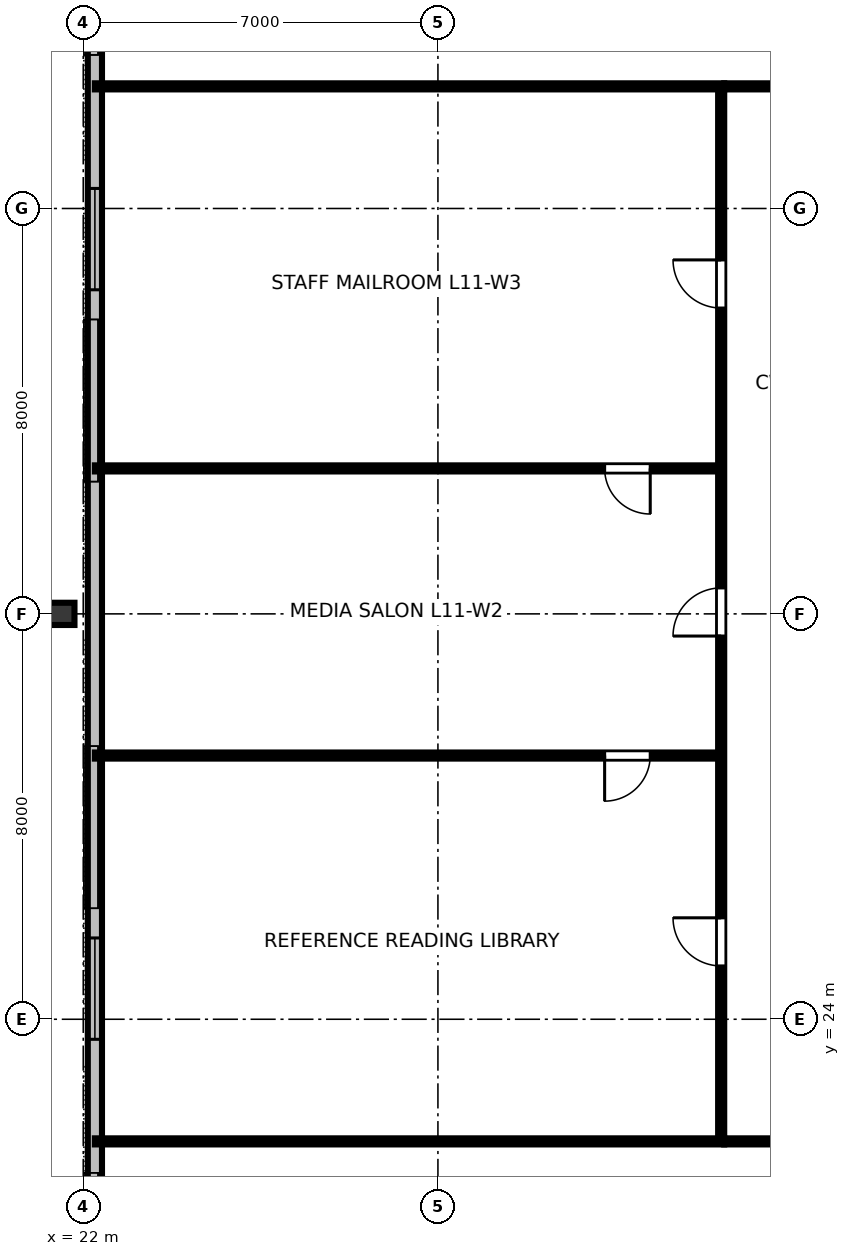
"""IFC4 building model, lengths in metres.
Left out: names, types, materials, properties, quantities, classifications, styles, units other than length and angle.
Written with IfcOpenShell. Run it as: python <this file> out.ifc"""

import sys

from ifc_helpers import new_model, si_unit, direction, frame, frame_2d, origin, origin_2d, place, context, subcontext, project, spatial, rectangle, i_section, extrude, element, fill, save


model = new_model("IFC4")
c1 = context("Model", 3, precision=1e-05, world=origin(), true_north=direction((0.0, 1.0)))
c2 = subcontext(c1, "Body", "Model", "MODEL_VIEW")
j1 = project(units=[si_unit("LENGTHUNIT", "METRE"), si_unit("PLANEANGLEUNIT", "RADIAN")], contexts=[c1])
p1 = place(None, origin())
s1 = spatial("IfcSite", under=j1, at=p1, CompositionType="ELEMENT")
p2 = place(p1, origin())
s2 = spatial("IfcBuilding", under=s1, at=p2, CompositionType="ELEMENT")
p3 = place(p2, frame((0.0, 0.0, 46.0)))
s3 = spatial("IfcBuildingStorey", under=s2, at=p3, CompositionType="ELEMENT", Elevation=46.0)
p4 = place(p3, frame((21.57, 32.0, 0.0), z_axis=(-0.110533045798, 0.0, 0.993872449455), x_axis=(0.993872449455, 0.0, 0.110533045798)))
e1 = element("IfcColumn", 1, at=p4, inside=s3, PredefinedType="COLUMN", context=c2, shape_type="SweptSolid", body=[
    extrude(i_section(OverallWidth=0.439, OverallDepth=0.514, WebThickness=0.06, FlangeThickness=0.097, FilletRadius=0.025, at=origin_2d()), origin(), (0.0, 0.0, 1.0), 3.167),
])
p5 = place(p3, frame((22.23, 49.74, 0.0), z_axis=(0.0, 0.0, 1.0), x_axis=(0.0, -1.0, 0.0)))
e2 = element("IfcWall", 2, at=p5, inside=s3, PredefinedType="STANDARD", context=c2, shape_type="SweptSolid", body=[
    extrude(rectangle(XDim=35.48, YDim=0.28, at=frame_2d((17.74, 0.0))), origin(), (0.0, 0.0, 1.0), 3.15),
])
p6 = place(p5, frame((1.949, 0.0, 0.8)))
e3 = element("IfcOpeningElement", 3, at=p6, cuts=e2, PredefinedType="OPENING", context=c2, shape_type="SweptSolid", body=[
    extrude(rectangle(XDim=2.0, YDim=1.95, at=frame_2d((1.0, 0.975))), frame((0.0, 0.15, 0.0), z_axis=(0.0, -1.0, 0.0), x_axis=(1.0, 0.0, 0.0)), (0.0, 0.0, 1.0), 0.3),
])
p7 = place(p5, frame((9.344, 0.0, 0.8)))
e4 = element("IfcOpeningElement", 4, at=p7, cuts=e2, PredefinedType="OPENING", context=c2, shape_type="SweptSolid", body=[
    extrude(rectangle(XDim=2.0, YDim=1.95, at=frame_2d((1.0, 0.975))), frame((0.0, 0.15, 0.0), z_axis=(0.0, -1.0, 0.0), x_axis=(1.0, 0.0, 0.0)), (0.0, 0.0, 1.0), 0.3),
])
p8 = place(p5, frame((24.135, 0.0, 0.8)))
e5 = element("IfcOpeningElement", 5, at=p8, cuts=e2, PredefinedType="OPENING", context=c2, shape_type="SweptSolid", body=[
    extrude(rectangle(XDim=2.0, YDim=1.95, at=frame_2d((1.0, 0.975))), frame((0.0, 0.15, 0.0), z_axis=(0.0, -1.0, 0.0), x_axis=(1.0, 0.0, 0.0)), (0.0, 0.0, 1.0), 0.3),
])
p9 = place(p5, frame((31.531, 0.0, 0.8)))
e6 = element("IfcOpeningElement", 6, at=p9, cuts=e2, PredefinedType="OPENING", context=c2, shape_type="SweptSolid", body=[
    extrude(rectangle(XDim=2.0, YDim=1.95, at=frame_2d((1.0, 0.975))), frame((0.0, 0.15, 0.0), z_axis=(0.0, -1.0, 0.0), x_axis=(1.0, 0.0, 0.0)), (0.0, 0.0, 1.0), 0.3),
])
p10 = place(p3, frame((34.65, 21.59, 0.0), z_axis=(0.0, 0.0, 1.0), x_axis=(1.0, 0.0, 0.0)))
e7 = element("IfcWall", 7, at=p10, inside=s3, PredefinedType="PARTITIONING", context=c2, shape_type="SweptSolid", body=[
    extrude(rectangle(XDim=22.7, YDim=0.12, at=frame_2d((11.35, 0.0))), origin(), (0.0, 0.0, 1.0), 2.43),
])
p11 = place(p10, frame((2.959, 0.0, 0.0)))
e8 = element("IfcOpeningElement", 8, at=p11, cuts=e7, PredefinedType="OPENING", context=c2, shape_type="SweptSolid", body=[
    extrude(rectangle(XDim=0.95, YDim=2.15, at=frame_2d((0.475, 1.075))), frame((0.0, 0.07, 0.0), z_axis=(0.0, -1.0, 0.0), x_axis=(1.0, 0.0, 0.0)), (0.0, 0.0, 1.0), 0.14),
])
p12 = place(p10, frame((7.709, 0.0, 0.0)))
e9 = element("IfcOpeningElement", 9, at=p12, cuts=e7, PredefinedType="OPENING", context=c2, shape_type="SweptSolid", body=[
    extrude(rectangle(XDim=0.95, YDim=2.15, at=frame_2d((0.475, 1.075))), frame((0.0, 0.07, 0.0), z_axis=(0.0, -1.0, 0.0), x_axis=(1.0, 0.0, 0.0)), (0.0, 0.0, 1.0), 0.14),
])
p13 = place(p10, frame((11.204, 0.0, 0.0)))
e10 = element("IfcOpeningElement", 10, at=p13, cuts=e7, PredefinedType="OPENING", context=c2, shape_type="SweptSolid", body=[
    extrude(rectangle(XDim=0.95, YDim=2.15, at=frame_2d((0.475, 1.075))), frame((0.0, 0.07, 0.0), z_axis=(0.0, -1.0, 0.0), x_axis=(1.0, 0.0, 0.0)), (0.0, 0.0, 1.0), 0.14),
])
p14 = place(p10, frame((17.665, 0.0, 0.0)))
e11 = element("IfcOpeningElement", 11, at=p14, cuts=e7, PredefinedType="OPENING", context=c2, shape_type="SweptSolid", body=[
    extrude(rectangle(XDim=0.95, YDim=2.15, at=frame_2d((0.475, 1.075))), frame((0.0, 0.07, 0.0), z_axis=(0.0, -1.0, 0.0), x_axis=(1.0, 0.0, 0.0)), (0.0, 0.0, 1.0), 0.14),
])
p15 = place(p3, frame((34.65, 42.41, 0.0), z_axis=(0.0, 0.0, 1.0), x_axis=(1.0, 0.0, 0.0)))
e12 = element("IfcWall", 12, at=p15, inside=s3, PredefinedType="PARTITIONING", context=c2, shape_type="SweptSolid", body=[
    extrude(rectangle(XDim=22.7, YDim=0.12, at=frame_2d((11.35, 0.0))), origin(), (0.0, 0.0, 1.0), 2.43),
])
p16 = place(p15, frame((10.875, 0.0, 0.0)))
e13 = element("IfcOpeningElement", 13, at=p16, cuts=e12, PredefinedType="OPENING", context=c2, shape_type="SweptSolid", body=[
    extrude(rectangle(XDim=0.95, YDim=2.15, at=frame_2d((0.475, 1.075))), frame((0.0, 0.07, 0.0), z_axis=(0.0, -1.0, 0.0), x_axis=(1.0, 0.0, 0.0)), (0.0, 0.0, 1.0), 0.14),
])
p17 = place(p3, frame((34.59, 29.204, 0.0), z_axis=(0.0, 0.0, 1.0), x_axis=(-1.0, 0.0, 0.0)))
e14 = element("IfcWall", 14, at=p17, inside=s3, PredefinedType="PARTITIONING", context=c2, shape_type="SweptSolid", body=[
    extrude(rectangle(XDim=12.36, YDim=0.12, at=frame_2d((6.18, 0.0))), origin(), (0.0, 0.0, 1.0), 2.43),
])
p18 = place(p17, frame((1.4, 0.0, 0.0)))
e15 = element("IfcOpeningElement", 15, at=p18, cuts=e14, PredefinedType="OPENING", context=c2, shape_type="SweptSolid", body=[
    extrude(rectangle(XDim=0.9, YDim=2.15, at=frame_2d((0.45, 1.075))), frame((0.0, 0.07, 0.0), z_axis=(0.0, -1.0, 0.0), x_axis=(1.0, 0.0, 0.0)), (0.0, 0.0, 1.0), 0.14),
])
p19 = place(p3, frame((34.59, 34.871, 0.0), z_axis=(0.0, 0.0, 1.0), x_axis=(-1.0, 0.0, 0.0)))
e16 = element("IfcWall", 16, at=p19, inside=s3, PredefinedType="PARTITIONING", context=c2, shape_type="SweptSolid", body=[
    extrude(rectangle(XDim=12.36, YDim=0.12, at=frame_2d((6.18, 0.0))), origin(), (0.0, 0.0, 1.0), 2.43),
])
p20 = place(p19, frame((1.4, 0.0, 0.0)))
e17 = element("IfcOpeningElement", 17, at=p20, cuts=e16, PredefinedType="OPENING", context=c2, shape_type="SweptSolid", body=[
    extrude(rectangle(XDim=0.9, YDim=2.15, at=frame_2d((0.45, 1.075))), frame((0.0, 0.07, 0.0), z_axis=(0.0, -1.0, 0.0), x_axis=(1.0, 0.0, 0.0)), (0.0, 0.0, 1.0), 0.14),
])
p21 = place(p3, frame((34.59, 21.65, 0.0), z_axis=(0.0, 0.0, 1.0), x_axis=(0.0, 1.0, 0.0)))
e18 = element("IfcWall", 18, at=p21, inside=s3, PredefinedType="PARTITIONING", context=c2, shape_type="SweptSolid", body=[
    extrude(rectangle(XDim=20.7, YDim=0.12, at=frame_2d((10.35, 0.0))), origin(), (0.0, 0.0, 1.0), 2.43),
])
p22 = place(p21, frame((3.402, 0.0, 0.0)))
e19 = element("IfcOpeningElement", 19, at=p22, cuts=e18, PredefinedType="OPENING", context=c2, shape_type="SweptSolid", body=[
    extrude(rectangle(XDim=0.95, YDim=2.15, at=frame_2d((0.475, 1.075))), frame((0.0, 0.07, 0.0), z_axis=(0.0, -1.0, 0.0), x_axis=(1.0, 0.0, 0.0)), (0.0, 0.0, 1.0), 0.14),
])
p23 = place(p21, frame((9.912, 0.0, 0.0)))
e20 = element("IfcOpeningElement", 20, at=p23, cuts=e18, PredefinedType="OPENING", context=c2, shape_type="SweptSolid", body=[
    extrude(rectangle(XDim=0.95, YDim=2.15, at=frame_2d((0.475, 1.075))), frame((0.0, 0.07, 0.0), z_axis=(0.0, -1.0, 0.0), x_axis=(1.0, 0.0, 0.0)), (0.0, 0.0, 1.0), 0.14),
])
p24 = place(p21, frame((16.385, 0.0, 0.0)))
e21 = element("IfcOpeningElement", 21, at=p24, cuts=e18, PredefinedType="OPENING", context=c2, shape_type="SweptSolid", body=[
    extrude(rectangle(XDim=0.95, YDim=2.15, at=frame_2d((0.475, 1.075))), frame((0.0, 0.07, 0.0), z_axis=(0.0, -1.0, 0.0), x_axis=(1.0, 0.0, 0.0)), (0.0, 0.0, 1.0), 0.14),
])
for number, where, z_axis, x_axis in (
    (22, (34.65, 21.59, 0.0), (0.0, 0.0, 1.0), (-1.0, 0.0, 0.0)),
    (23, (34.65, 42.41, 0.0), (0.0, 0.0, 1.0), (-1.0, 0.0, 0.0)),
):
    element("IfcWall", number, at=place(p3, frame(where, z_axis=z_axis, x_axis=x_axis)), inside=s3, PredefinedType="PARTITIONING", context=c2, shape_type="SweptSolid", body=[
        extrude(rectangle(XDim=12.42, YDim=0.12, at=frame_2d((6.21, 0.0))), origin(), (0.0, 0.0, 1.0), 2.43),
    ])
p25 = place(p7, origin())
e24 = element("IfcWindow", 24, at=p25, inside=s3, PartitioningType="SINGLE_PANEL", PredefinedType="WINDOW", context=c2, shape_type="SweptSolid", body=[
    extrude(rectangle(XDim=2.0, YDim=1.95, at=frame_2d((1.0, 0.975))), frame((0.0, 0.03, 0.0), z_axis=(0.0, -1.0, 0.0), x_axis=(1.0, 0.0, 0.0)), (0.0, 0.0, 1.0), 0.06),
])
fill(e4, e24)
p26 = place(p8, origin())
e25 = element("IfcWindow", 25, at=p26, inside=s3, PartitioningType="SINGLE_PANEL", PredefinedType="WINDOW", context=c2, shape_type="SweptSolid", body=[
    extrude(rectangle(XDim=2.0, YDim=1.95, at=frame_2d((1.0, 0.975))), frame((0.0, 0.03, 0.0), z_axis=(0.0, -1.0, 0.0), x_axis=(1.0, 0.0, 0.0)), (0.0, 0.0, 1.0), 0.06),
])
fill(e5, e25)
p27 = place(p18, origin())
e26 = element("IfcDoor", 26, at=p27, inside=s3, OperationType="SINGLE_SWING_RIGHT", PredefinedType="DOOR", context=c2, shape_type="SweptSolid", body=[
    extrude(rectangle(XDim=0.9, YDim=2.15, at=frame_2d((0.45, 1.075))), frame((0.0, 0.025, 0.0), z_axis=(0.0, -1.0, 0.0), x_axis=(1.0, 0.0, 0.0)), (0.0, 0.0, 1.0), 0.05),
])
fill(e15, e26)
p28 = place(p20, origin())
e27 = element("IfcDoor", 27, at=p28, inside=s3, OperationType="SINGLE_SWING_LEFT", PredefinedType="DOOR", context=c2, shape_type="SweptSolid", body=[
    extrude(rectangle(XDim=0.9, YDim=2.15, at=frame_2d((0.45, 1.075))), frame((0.0, 0.025, 0.0), z_axis=(0.0, -1.0, 0.0), x_axis=(1.0, 0.0, 0.0)), (0.0, 0.0, 1.0), 0.05),
])
fill(e17, e27)
p29 = place(p22, origin())
e28 = element("IfcDoor", 28, at=p29, inside=s3, OperationType="SINGLE_SWING_RIGHT", PredefinedType="DOOR", context=c2, shape_type="SweptSolid", body=[
    extrude(rectangle(XDim=0.95, YDim=2.15, at=frame_2d((0.475, 1.075))), frame((0.0, 0.025, 0.0), z_axis=(0.0, -1.0, 0.0), x_axis=(1.0, 0.0, 0.0)), (0.0, 0.0, 1.0), 0.05),
])
fill(e19, e28)
p30 = place(p23, origin())
e29 = element("IfcDoor", 29, at=p30, inside=s3, OperationType="SINGLE_SWING_LEFT", PredefinedType="DOOR", context=c2, shape_type="SweptSolid", body=[
    extrude(rectangle(XDim=0.95, YDim=2.15, at=frame_2d((0.475, 1.075))), frame((0.0, 0.025, 0.0), z_axis=(0.0, -1.0, 0.0), x_axis=(1.0, 0.0, 0.0)), (0.0, 0.0, 1.0), 0.05),
])
fill(e20, e29)
p31 = place(p24, origin())
e30 = element("IfcDoor", 30, at=p31, inside=s3, OperationType="SINGLE_SWING_RIGHT", PredefinedType="DOOR", context=c2, shape_type="SweptSolid", body=[
    extrude(rectangle(XDim=0.95, YDim=2.15, at=frame_2d((0.475, 1.075))), frame((0.0, 0.025, 0.0), z_axis=(0.0, -1.0, 0.0), x_axis=(1.0, 0.0, 0.0)), (0.0, 0.0, 1.0), 0.05),
])
fill(e21, e30)
save(model, sys.argv[1])
